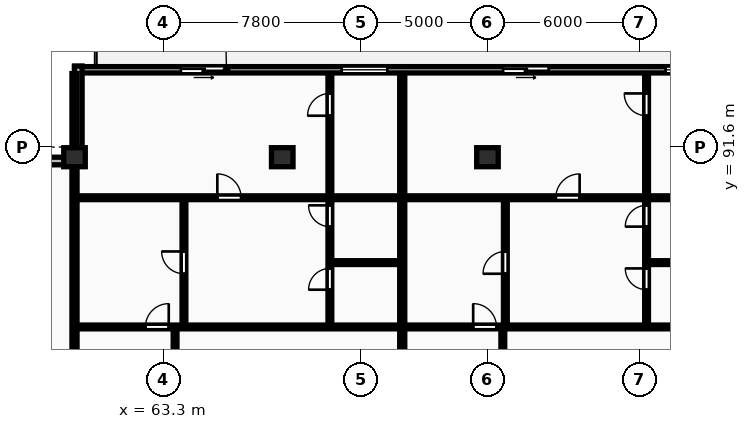
"""IFC4 building model, lengths in metres.
Left out: names, types, materials, properties, quantities, classifications, styles, units other than length and angle.
Written with IfcOpenShell. Run it as: python <this file> out.ifc"""

import sys

from ifc_helpers import new_model, si_unit, direction, frame, frame_2d, origin, origin_2d, place, context, subcontext, project, spatial, rectangle, extrude, element, fill, save


model = new_model("IFC4")
c1 = context("Model", 3, precision=1e-05, world=origin(), true_north=direction((0.0, 1.0)))
c2 = subcontext(c1, "Body", "Model", "MODEL_VIEW")
j1 = project(units=[si_unit("LENGTHUNIT", "METRE"), si_unit("PLANEANGLEUNIT", "RADIAN")], contexts=[c1])
p1 = place(None, origin())
s1 = spatial("IfcSite", under=j1, at=p1, CompositionType="ELEMENT")
p2 = place(p1, origin())
s2 = spatial("IfcBuilding", under=s1, at=p2, CompositionType="ELEMENT")
p3 = place(p2, frame((0.0, 0.0, 210.85)))
s3 = spatial("IfcBuildingStorey", under=s2, at=p3, CompositionType="ELEMENT", Elevation=210.85)
for number, where, z_axis, x_axis in (
    (1, (59.8, 91.2, 0.0), (0.0, 0.0, 1.0), (1.0, 0.0, 0.0)),
    (2, (68.0, 91.2, 0.0), (0.0, 0.0, 1.0), (1.0, 0.0, 0.0)),
    (3, (76.1, 91.2, 0.0), (0.0, 0.0, 1.0), (1.0, 0.0, 0.0)),
):
    element("IfcColumn", number, at=place(p3, frame(where, z_axis=z_axis, x_axis=x_axis)), inside=s3, PredefinedType="COLUMN", context=c2, shape_type="SweptSolid", body=[
        extrude(rectangle(XDim=0.85, YDim=0.75, at=origin_2d()), origin(), (0.0, 0.0, 1.0), 3.25),
    ])
p4 = place(p3, frame((128.4, 94.65, 0.0), z_axis=(0.0, 0.0, 1.0), x_axis=(-1.0, 0.0, 0.0)))
e4 = element("IfcWall", 4, at=p4, inside=s3, PredefinedType="STANDARD", context=c2, shape_type="SweptSolid", body=[
    extrude(rectangle(XDim=68.6, YDim=0.25, at=frame_2d((34.3, 0.0))), origin(), (0.0, 0.0, 1.0), 2.97),
])
p5 = place(p4, frame((62.6, 0.0, 0.0)))
e5 = element("IfcOpeningElement", 5, at=p5, cuts=e4, PredefinedType="OPENING", context=c2, shape_type="SweptSolid", body=[
    extrude(rectangle(XDim=1.8, YDim=2.2, at=frame_2d((0.9, 1.1))), frame((0.0, 0.135, 0.0), z_axis=(0.0, -1.0, 0.0), x_axis=(1.0, 0.0, 0.0)), (0.0, 0.0, 1.0), 0.27),
])
p6 = place(p4, frame((56.252, 0.0, 0.85)))
e6 = element("IfcOpeningElement", 6, at=p6, cuts=e4, PredefinedType="OPENING", context=c2, shape_type="SweptSolid", body=[
    extrude(rectangle(XDim=1.8, YDim=1.8, at=frame_2d((0.9, 0.9))), frame((0.0, 0.135, 0.0), z_axis=(0.0, -1.0, 0.0), x_axis=(1.0, 0.0, 0.0)), (0.0, 0.0, 1.0), 0.27),
])
p7 = place(p4, frame((49.882, 0.0, 0.0)))
e7 = element("IfcOpeningElement", 7, at=p7, cuts=e4, PredefinedType="OPENING", context=c2, shape_type="SweptSolid", body=[
    extrude(rectangle(XDim=1.8, YDim=2.2, at=frame_2d((0.9, 1.1))), frame((0.0, 0.135, 0.0), z_axis=(0.0, -1.0, 0.0), x_axis=(1.0, 0.0, 0.0)), (0.0, 0.0, 1.0), 0.27),
])
p8 = place(p4, frame((43.47, 0.0, 0.85)))
e8 = element("IfcOpeningElement", 8, at=p8, cuts=e4, PredefinedType="OPENING", context=c2, shape_type="SweptSolid", body=[
    extrude(rectangle(XDim=1.8, YDim=1.8, at=frame_2d((0.9, 0.9))), frame((0.0, 0.135, 0.0), z_axis=(0.0, -1.0, 0.0), x_axis=(1.0, 0.0, 0.0)), (0.0, 0.0, 1.0), 0.27),
])
p9 = place(p4, frame((36.75, 0.0, 0.0)))
e9 = element("IfcOpeningElement", 9, at=p9, cuts=e4, PredefinedType="OPENING", context=c2, shape_type="SweptSolid", body=[
    extrude(rectangle(XDim=1.8, YDim=2.2, at=frame_2d((0.9, 1.1))), frame((0.0, 0.135, 0.0), z_axis=(0.0, -1.0, 0.0), x_axis=(1.0, 0.0, 0.0)), (0.0, 0.0, 1.0), 0.27),
])
p10 = place(p4, frame((30.402, 0.0, 0.85)))
e10 = element("IfcOpeningElement", 10, at=p10, cuts=e4, PredefinedType="OPENING", context=c2, shape_type="SweptSolid", body=[
    extrude(rectangle(XDim=1.8, YDim=1.8, at=frame_2d((0.9, 0.9))), frame((0.0, 0.135, 0.0), z_axis=(0.0, -1.0, 0.0), x_axis=(1.0, 0.0, 0.0)), (0.0, 0.0, 1.0), 0.27),
])
p11 = place(p4, frame((23.882, 0.0, 0.0)))
e11 = element("IfcOpeningElement", 11, at=p11, cuts=e4, PredefinedType="OPENING", context=c2, shape_type="SweptSolid", body=[
    extrude(rectangle(XDim=1.8, YDim=2.2, at=frame_2d((0.9, 1.1))), frame((0.0, 0.135, 0.0), z_axis=(0.0, -1.0, 0.0), x_axis=(1.0, 0.0, 0.0)), (0.0, 0.0, 1.0), 0.27),
])
p12 = place(p4, frame((17.47, 0.0, 0.85)))
e12 = element("IfcOpeningElement", 12, at=p12, cuts=e4, PredefinedType="OPENING", context=c2, shape_type="SweptSolid", body=[
    extrude(rectangle(XDim=1.8, YDim=1.8, at=frame_2d((0.9, 0.9))), frame((0.0, 0.135, 0.0), z_axis=(0.0, -1.0, 0.0), x_axis=(1.0, 0.0, 0.0)), (0.0, 0.0, 1.0), 0.27),
])
p13 = place(p4, frame((9.415, 0.0, 0.85)))
e13 = element("IfcOpeningElement", 13, at=p13, cuts=e4, PredefinedType="OPENING", context=c2, shape_type="SweptSolid", body=[
    extrude(rectangle(XDim=1.8, YDim=1.8, at=frame_2d((0.9, 0.9))), frame((0.0, 0.135, 0.0), z_axis=(0.0, -1.0, 0.0), x_axis=(1.0, 0.0, 0.0)), (0.0, 0.0, 1.0), 0.27),
])
p14 = place(p4, frame((5.756, 0.0, 0.85)))
e14 = element("IfcOpeningElement", 14, at=p14, cuts=e4, PredefinedType="OPENING", context=c2, shape_type="SweptSolid", body=[
    extrude(rectangle(XDim=1.8, YDim=1.8, at=frame_2d((0.9, 0.9))), frame((0.0, 0.135, 0.0), z_axis=(0.0, -1.0, 0.0), x_axis=(1.0, 0.0, 0.0)), (0.0, 0.0, 1.0), 0.27),
])
p15 = place(p4, frame((13.35, 0.0, 0.0)))
e15 = element("IfcOpeningElement", 15, at=p15, cuts=e4, PredefinedType="OPENING", context=c2, shape_type="SweptSolid", body=[
    extrude(rectangle(XDim=1.8, YDim=2.2, at=frame_2d((0.9, 1.1))), frame((0.0, 0.135, 0.0), z_axis=(0.0, -1.0, 0.0), x_axis=(1.0, 0.0, 0.0)), (0.0, 0.0, 1.0), 0.27),
])
p16 = place(p4, frame((1.21, 0.0, 0.85)))
e16 = element("IfcOpeningElement", 16, at=p16, cuts=e4, PredefinedType="OPENING", context=c2, shape_type="SweptSolid", body=[
    extrude(rectangle(XDim=2.4, YDim=1.9, at=frame_2d((1.2, 0.95))), frame((0.0, 0.135, 0.0), z_axis=(0.0, -1.0, 0.0), x_axis=(1.0, 0.0, 0.0)), (0.0, 0.0, 1.0), 0.27),
])
for number, where, z_axis, x_axis in (
    (17, (59.95, 94.8, 0.0), (0.0, 0.0, 1.0), (0.0, -1.0, 0.0)),
    (18, (59.8, 91.05, 0.0), (0.0, 0.0, 1.0), (-1.0, 0.0, 0.0)),
):
    element("IfcWall", number, at=place(p3, frame(where, z_axis=z_axis, x_axis=x_axis)), inside=s3, PredefinedType="STANDARD", context=c2, shape_type="SweptSolid", body=[
        extrude(rectangle(XDim=3.6, YDim=0.3, at=frame_2d((1.8, 0.0))), origin(), (0.0, 0.0, 1.0), 2.97),
    ])
p17 = place(p3, frame((59.8, 70.18, 0.0), z_axis=(0.0, 0.0, 1.0), x_axis=(0.0, 1.0, 0.0)))
e19 = element("IfcWall", 19, at=p17, inside=s3, PredefinedType="PARTITIONING", context=c2, shape_type="SweptSolid", body=[
    extrude(rectangle(XDim=24.32, YDim=0.2, at=frame_2d((12.16, 0.0))), origin(), (0.0, 0.0, 1.0), 2.277),
])
p18 = place(p3, frame((72.736, 70.18, 0.0), z_axis=(0.0, 0.0, 1.0), x_axis=(0.0, 1.0, 0.0)))
e20 = element("IfcWall", 20, at=p18, inside=s3, PredefinedType="PARTITIONING", context=c2, shape_type="SweptSolid", body=[
    extrude(rectangle(XDim=24.32, YDim=0.2, at=frame_2d((12.16, 0.0))), origin(), (0.0, 0.0, 1.0), 2.97),
])
p19 = place(p3, frame((63.77, 70.16, 0.0), z_axis=(0.0, 0.0, 1.0), x_axis=(0.0, 1.0, 0.0)))
e21 = element("IfcWall", 21, at=p19, inside=s3, PredefinedType="PARTITIONING", context=c2, shape_type="SweptSolid", body=[
    extrude(rectangle(XDim=14.3, YDim=0.15, at=frame_2d((7.15, 0.0))), origin(), (0.0, 0.0, 1.0), 2.97),
])
p20 = place(p19, frame((6.02, 0.0, 0.0)))
e22 = element("IfcOpeningElement", 22, at=p20, cuts=e21, PredefinedType="OPENING", context=c2, shape_type="SweptSolid", body=[
    extrude(rectangle(XDim=0.88, YDim=2.06, at=frame_2d((0.44, 1.03))), frame((0.0, 0.085, 0.0), z_axis=(0.0, -1.0, 0.0), x_axis=(1.0, 0.0, 0.0)), (0.0, 0.0, 1.0), 0.17),
])
p21 = place(p3, frame((64.12, 84.54, 0.0), z_axis=(0.0, 0.0, 1.0), x_axis=(0.0, 1.0, 0.0)))
e23 = element("IfcWall", 23, at=p21, inside=s3, PredefinedType="PARTITIONING", context=c2, shape_type="SweptSolid", body=[
    extrude(rectangle(XDim=5.0, YDim=0.15, at=frame_2d((2.5, 0.0))), origin(), (0.0, 0.0, 1.0), 2.97),
])
p22 = place(p21, frame((2.06, 0.0, 0.0)))
e24 = element("IfcOpeningElement", 24, at=p22, cuts=e23, PredefinedType="OPENING", context=c2, shape_type="SweptSolid", body=[
    extrude(rectangle(XDim=0.88, YDim=2.06, at=frame_2d((0.44, 1.03))), frame((0.0, 0.085, 0.0), z_axis=(0.0, -1.0, 0.0), x_axis=(1.0, 0.0, 0.0)), (0.0, 0.0, 1.0), 0.17),
])
p23 = place(p3, frame((69.94, 87.04, 0.0), z_axis=(0.0, 0.0, 1.0), x_axis=(1.0, 0.0, 0.0)))
e25 = element("IfcWall", 25, at=p23, inside=s3, PredefinedType="PARTITIONING", context=c2, shape_type="SweptSolid", body=[
    extrude(rectangle(XDim=2.716, YDim=0.15, at=frame_2d((1.358, 0.0))), origin(), (0.0, 0.0, 1.0), 2.97),
])
p24 = place(p3, frame((69.88, 84.54, 0.0), z_axis=(0.0, 0.0, 1.0), x_axis=(0.0, 1.0, 0.0)))
e26 = element("IfcWall", 26, at=p24, inside=s3, PredefinedType="PARTITIONING", context=c2, shape_type="SweptSolid", body=[
    extrude(rectangle(XDim=9.96, YDim=0.15, at=frame_2d((4.98, 0.0))), origin(), (0.0, 0.0, 1.0), 2.97),
])
p25 = place(p24, frame((1.43, 0.0, 0.0)))
e27 = element("IfcOpeningElement", 27, at=p25, cuts=e26, PredefinedType="OPENING", context=c2, shape_type="SweptSolid", body=[
    extrude(rectangle(XDim=0.84, YDim=2.04, at=frame_2d((0.42, 1.02))), frame((0.0, 0.085, 0.0), z_axis=(0.0, -1.0, 0.0), x_axis=(1.0, 0.0, 0.0)), (0.0, 0.0, 1.0), 0.17),
])
p26 = place(p24, frame((3.92, 0.0, 0.0)))
e28 = element("IfcOpeningElement", 28, at=p26, cuts=e26, PredefinedType="OPENING", context=c2, shape_type="SweptSolid", body=[
    extrude(rectangle(XDim=0.84, YDim=2.04, at=frame_2d((0.42, 1.02))), frame((0.0, 0.085, 0.0), z_axis=(0.0, -1.0, 0.0), x_axis=(1.0, 0.0, 0.0)), (0.0, 0.0, 1.0), 0.17),
])
p27 = place(p24, frame((8.297, 0.0, 0.0)))
e29 = element("IfcOpeningElement", 29, at=p27, cuts=e26, PredefinedType="OPENING", context=c2, shape_type="SweptSolid", body=[
    extrude(rectangle(XDim=0.88, YDim=2.06, at=frame_2d((0.44, 1.03))), frame((0.0, 0.085, 0.0), z_axis=(0.0, -1.0, 0.0), x_axis=(1.0, 0.0, 0.0)), (0.0, 0.0, 1.0), 0.17),
])
p28 = place(p3, frame((59.88, 84.5, 0.0), z_axis=(0.0, 0.0, 1.0), x_axis=(1.0, 0.0, 0.0)))
e30 = element("IfcWall", 30, at=p28, inside=s3, PredefinedType="PARTITIONING", context=c2, shape_type="SweptSolid", body=[
    extrude(rectangle(XDim=12.776, YDim=0.15, at=frame_2d((6.388, 0.0))), origin(), (0.0, 0.0, 1.0), 2.97),
])
p29 = place(p28, frame((2.72, 0.0, 0.0)))
e31 = element("IfcOpeningElement", 31, at=p29, cuts=e30, PredefinedType="OPENING", context=c2, shape_type="SweptSolid", body=[
    extrude(rectangle(XDim=0.92, YDim=2.08, at=frame_2d((0.46, 1.04))), frame((0.0, 0.085, 0.0), z_axis=(0.0, -1.0, 0.0), x_axis=(1.0, 0.0, 0.0)), (0.0, 0.0, 1.0), 0.17),
])
p30 = place(p3, frame((59.88, 89.6, 0.0), z_axis=(0.0, 0.0, 1.0), x_axis=(1.0, 0.0, 0.0)))
e32 = element("IfcWall", 32, at=p30, inside=s3, PredefinedType="PARTITIONING", context=c2, shape_type="SweptSolid", body=[
    extrude(rectangle(XDim=12.776, YDim=0.15, at=frame_2d((6.388, 0.0))), origin(), (0.0, 0.0, 1.0), 2.97),
])
p31 = place(p30, frame((5.557, 0.0, 0.0)))
e33 = element("IfcOpeningElement", 33, at=p31, cuts=e32, PredefinedType="OPENING", context=c2, shape_type="SweptSolid", body=[
    extrude(rectangle(XDim=0.94, YDim=2.1, at=frame_2d((0.47, 1.05))), frame((0.0, 0.085, 0.0), z_axis=(0.0, -1.0, 0.0), x_axis=(1.0, 0.0, 0.0)), (0.0, 0.0, 1.0), 0.17),
])
p32 = place(p3, frame((76.706, 70.16, 0.0), z_axis=(0.0, 0.0, 1.0), x_axis=(0.0, 1.0, 0.0)))
e34 = element("IfcWall", 34, at=p32, inside=s3, PredefinedType="PARTITIONING", context=c2, shape_type="SweptSolid", body=[
    extrude(rectangle(XDim=14.3, YDim=0.15, at=frame_2d((7.15, 0.0))), origin(), (0.0, 0.0, 1.0), 2.97),
])
p33 = place(p32, frame((6.2, 0.0, 0.0)))
e35 = element("IfcOpeningElement", 35, at=p33, cuts=e34, PredefinedType="OPENING", context=c2, shape_type="SweptSolid", body=[
    extrude(rectangle(XDim=0.88, YDim=2.06, at=frame_2d((0.44, 1.03))), frame((0.0, 0.085, 0.0), z_axis=(0.0, -1.0, 0.0), x_axis=(1.0, 0.0, 0.0)), (0.0, 0.0, 1.0), 0.17),
])
p34 = place(p3, frame((76.806, 84.54, 0.0), z_axis=(0.0, 0.0, 1.0), x_axis=(0.0, 1.0, 0.0)))
e36 = element("IfcWall", 36, at=p34, inside=s3, PredefinedType="PARTITIONING", context=c2, shape_type="SweptSolid", body=[
    extrude(rectangle(XDim=5.0, YDim=0.15, at=frame_2d((2.5, 0.0))), origin(), (0.0, 0.0, 1.0), 2.97),
])
p35 = place(p34, frame((2.06, 0.0, 0.0)))
e37 = element("IfcOpeningElement", 37, at=p35, cuts=e36, PredefinedType="OPENING", context=c2, shape_type="SweptSolid", body=[
    extrude(rectangle(XDim=0.88, YDim=2.06, at=frame_2d((0.44, 1.03))), frame((0.0, 0.085, 0.0), z_axis=(0.0, -1.0, 0.0), x_axis=(1.0, 0.0, 0.0)), (0.0, 0.0, 1.0), 0.17),
])
p36 = place(p3, frame((82.44, 87.04, 0.0), z_axis=(0.0, 0.0, 1.0), x_axis=(1.0, 0.0, 0.0)))
e38 = element("IfcWall", 38, at=p36, inside=s3, PredefinedType="PARTITIONING", context=c2, shape_type="SweptSolid", body=[
    extrude(rectangle(XDim=3.28, YDim=0.15, at=frame_2d((1.64, 0.0))), origin(), (0.0, 0.0, 1.0), 2.97),
])
p37 = place(p3, frame((82.38, 84.54, 0.0), z_axis=(0.0, 0.0, 1.0), x_axis=(0.0, 1.0, 0.0)))
e39 = element("IfcWall", 39, at=p37, inside=s3, PredefinedType="PARTITIONING", context=c2, shape_type="SweptSolid", body=[
    extrude(rectangle(XDim=9.96, YDim=0.15, at=frame_2d((4.98, 0.0))), origin(), (0.0, 0.0, 1.0), 2.97),
])
p38 = place(p37, frame((1.43, 0.0, 0.0)))
e40 = element("IfcOpeningElement", 40, at=p38, cuts=e39, PredefinedType="OPENING", context=c2, shape_type="SweptSolid", body=[
    extrude(rectangle(XDim=0.84, YDim=2.04, at=frame_2d((0.42, 1.02))), frame((0.0, 0.085, 0.0), z_axis=(0.0, -1.0, 0.0), x_axis=(1.0, 0.0, 0.0)), (0.0, 0.0, 1.0), 0.17),
])
p39 = place(p37, frame((3.92, 0.0, 0.0)))
e41 = element("IfcOpeningElement", 41, at=p39, cuts=e39, PredefinedType="OPENING", context=c2, shape_type="SweptSolid", body=[
    extrude(rectangle(XDim=0.84, YDim=2.04, at=frame_2d((0.42, 1.02))), frame((0.0, 0.085, 0.0), z_axis=(0.0, -1.0, 0.0), x_axis=(1.0, 0.0, 0.0)), (0.0, 0.0, 1.0), 0.17),
])
p40 = place(p37, frame((8.297, 0.0, 0.0)))
e42 = element("IfcOpeningElement", 42, at=p40, cuts=e39, PredefinedType="OPENING", context=c2, shape_type="SweptSolid", body=[
    extrude(rectangle(XDim=0.88, YDim=2.06, at=frame_2d((0.44, 1.03))), frame((0.0, 0.085, 0.0), z_axis=(0.0, -1.0, 0.0), x_axis=(1.0, 0.0, 0.0)), (0.0, 0.0, 1.0), 0.17),
])
p41 = place(p3, frame((72.816, 84.5, 0.0), z_axis=(0.0, 0.0, 1.0), x_axis=(1.0, 0.0, 0.0)))
e43 = element("IfcWall", 43, at=p41, inside=s3, PredefinedType="PARTITIONING", context=c2, shape_type="SweptSolid", body=[
    extrude(rectangle(XDim=12.904, YDim=0.15, at=frame_2d((6.452, 0.0))), origin(), (0.0, 0.0, 1.0), 2.97),
])
p42 = place(p41, frame((2.72, 0.0, 0.0)))
e44 = element("IfcOpeningElement", 44, at=p42, cuts=e43, PredefinedType="OPENING", context=c2, shape_type="SweptSolid", body=[
    extrude(rectangle(XDim=0.92, YDim=2.08, at=frame_2d((0.46, 1.04))), frame((0.0, 0.085, 0.0), z_axis=(0.0, -1.0, 0.0), x_axis=(1.0, 0.0, 0.0)), (0.0, 0.0, 1.0), 0.17),
])
p43 = place(p3, frame((72.816, 89.6, 0.0), z_axis=(0.0, 0.0, 1.0), x_axis=(1.0, 0.0, 0.0)))
e45 = element("IfcWall", 45, at=p43, inside=s3, PredefinedType="PARTITIONING", context=c2, shape_type="SweptSolid", body=[
    extrude(rectangle(XDim=12.904, YDim=0.15, at=frame_2d((6.452, 0.0))), origin(), (0.0, 0.0, 1.0), 2.97),
])
p44 = place(p43, frame((5.982, 0.0, 0.0)))
e46 = element("IfcOpeningElement", 46, at=p44, cuts=e45, PredefinedType="OPENING", context=c2, shape_type="SweptSolid", body=[
    extrude(rectangle(XDim=0.94, YDim=2.1, at=frame_2d((0.47, 1.05))), frame((0.0, 0.085, 0.0), z_axis=(0.0, -1.0, 0.0), x_axis=(1.0, 0.0, 0.0)), (0.0, 0.0, 1.0), 0.17),
])
p45 = place(p5, origin())
e47 = element("IfcDoor", 47, at=p45, inside=s3, OperationType="SLIDING_TO_LEFT", PredefinedType="DOOR", context=c2, shape_type="SweptSolid", body=[
    extrude(rectangle(XDim=1.8, YDim=2.2, at=frame_2d((0.9, 1.1))), frame((0.0, 0.025, 0.0), z_axis=(0.0, -1.0, 0.0), x_axis=(1.0, 0.0, 0.0)), (0.0, 0.0, 1.0), 0.05),
])
fill(e5, e47)
p46 = place(p6, origin())
e48 = element("IfcWindow", 48, at=p46, inside=s3, PartitioningType="SINGLE_PANEL", PredefinedType="WINDOW", context=c2, shape_type="SweptSolid", body=[
    extrude(rectangle(XDim=1.8, YDim=1.8, at=frame_2d((0.9, 0.9))), frame((0.0, 0.03, 0.0), z_axis=(0.0, -1.0, 0.0), x_axis=(1.0, 0.0, 0.0)), (0.0, 0.0, 1.0), 0.06),
])
fill(e6, e48)
p47 = place(p7, origin())
e49 = element("IfcDoor", 49, at=p47, inside=s3, OperationType="SLIDING_TO_LEFT", PredefinedType="DOOR", context=c2, shape_type="SweptSolid", body=[
    extrude(rectangle(XDim=1.8, YDim=2.2, at=frame_2d((0.9, 1.1))), frame((0.0, 0.025, 0.0), z_axis=(0.0, -1.0, 0.0), x_axis=(1.0, 0.0, 0.0)), (0.0, 0.0, 1.0), 0.05),
])
fill(e7, e49)
p48 = place(p8, origin())
e50 = element("IfcWindow", 50, at=p48, inside=s3, PartitioningType="SINGLE_PANEL", PredefinedType="WINDOW", context=c2, shape_type="SweptSolid", body=[
    extrude(rectangle(XDim=1.8, YDim=1.8, at=frame_2d((0.9, 0.9))), frame((0.0, 0.03, 0.0), z_axis=(0.0, -1.0, 0.0), x_axis=(1.0, 0.0, 0.0)), (0.0, 0.0, 1.0), 0.06),
])
fill(e8, e50)
p49 = place(p22, origin())
e51 = element("IfcDoor", 51, at=p49, inside=s3, OperationType="SINGLE_SWING_RIGHT", PredefinedType="DOOR", context=c2, shape_type="SweptSolid", body=[
    extrude(rectangle(XDim=0.88, YDim=2.06, at=frame_2d((0.44, 1.03))), frame((0.0, 0.025, 0.0), z_axis=(0.0, -1.0, 0.0), x_axis=(1.0, 0.0, 0.0)), (0.0, 0.0, 1.0), 0.05),
])
fill(e24, e51)
p50 = place(p25, origin())
e52 = element("IfcDoor", 52, at=p50, inside=s3, OperationType="SINGLE_SWING_LEFT", PredefinedType="DOOR", context=c2, shape_type="SweptSolid", body=[
    extrude(rectangle(XDim=0.84, YDim=2.04, at=frame_2d((0.42, 1.02))), frame((0.0, 0.025, 0.0), z_axis=(0.0, -1.0, 0.0), x_axis=(1.0, 0.0, 0.0)), (0.0, 0.0, 1.0), 0.05),
])
fill(e27, e52)
p51 = place(p26, origin())
e53 = element("IfcDoor", 53, at=p51, inside=s3, OperationType="SINGLE_SWING_RIGHT", PredefinedType="DOOR", context=c2, shape_type="SweptSolid", body=[
    extrude(rectangle(XDim=0.84, YDim=2.04, at=frame_2d((0.42, 1.02))), frame((0.0, 0.025, 0.0), z_axis=(0.0, -1.0, 0.0), x_axis=(1.0, 0.0, 0.0)), (0.0, 0.0, 1.0), 0.05),
])
fill(e28, e53)
p52 = place(p27, origin())
e54 = element("IfcDoor", 54, at=p52, inside=s3, OperationType="SINGLE_SWING_LEFT", PredefinedType="DOOR", context=c2, shape_type="SweptSolid", body=[
    extrude(rectangle(XDim=0.88, YDim=2.06, at=frame_2d((0.44, 1.03))), frame((0.0, 0.025, 0.0), z_axis=(0.0, -1.0, 0.0), x_axis=(1.0, 0.0, 0.0)), (0.0, 0.0, 1.0), 0.05),
])
fill(e29, e54)
p53 = place(p29, origin())
e55 = element("IfcDoor", 55, at=p53, inside=s3, OperationType="SINGLE_SWING_RIGHT", PredefinedType="DOOR", context=c2, shape_type="SweptSolid", body=[
    extrude(rectangle(XDim=0.92, YDim=2.08, at=frame_2d((0.46, 1.04))), frame((0.0, 0.025, 0.0), z_axis=(0.0, -1.0, 0.0), x_axis=(1.0, 0.0, 0.0)), (0.0, 0.0, 1.0), 0.05),
])
fill(e31, e55)
p54 = place(p31, origin())
e56 = element("IfcDoor", 56, at=p54, inside=s3, OperationType="SINGLE_SWING_LEFT", PredefinedType="DOOR", context=c2, shape_type="SweptSolid", body=[
    extrude(rectangle(XDim=0.94, YDim=2.1, at=frame_2d((0.47, 1.05))), frame((0.0, 0.025, 0.0), z_axis=(0.0, -1.0, 0.0), x_axis=(1.0, 0.0, 0.0)), (0.0, 0.0, 1.0), 0.05),
])
fill(e33, e56)
p55 = place(p35, origin())
e57 = element("IfcDoor", 57, at=p55, inside=s3, OperationType="SINGLE_SWING_LEFT", PredefinedType="DOOR", context=c2, shape_type="SweptSolid", body=[
    extrude(rectangle(XDim=0.88, YDim=2.06, at=frame_2d((0.44, 1.03))), frame((0.0, 0.025, 0.0), z_axis=(0.0, -1.0, 0.0), x_axis=(1.0, 0.0, 0.0)), (0.0, 0.0, 1.0), 0.05),
])
fill(e37, e57)
p56 = place(p38, origin())
e58 = element("IfcDoor", 58, at=p56, inside=s3, OperationType="SINGLE_SWING_RIGHT", PredefinedType="DOOR", context=c2, shape_type="SweptSolid", body=[
    extrude(rectangle(XDim=0.84, YDim=2.04, at=frame_2d((0.42, 1.02))), frame((0.0, 0.025, 0.0), z_axis=(0.0, -1.0, 0.0), x_axis=(1.0, 0.0, 0.0)), (0.0, 0.0, 1.0), 0.05),
])
fill(e40, e58)
p57 = place(p39, origin())
e59 = element("IfcDoor", 59, at=p57, inside=s3, OperationType="SINGLE_SWING_LEFT", PredefinedType="DOOR", context=c2, shape_type="SweptSolid", body=[
    extrude(rectangle(XDim=0.84, YDim=2.04, at=frame_2d((0.42, 1.02))), frame((0.0, 0.025, 0.0), z_axis=(0.0, -1.0, 0.0), x_axis=(1.0, 0.0, 0.0)), (0.0, 0.0, 1.0), 0.05),
])
fill(e41, e59)
p58 = place(p40, origin())
e60 = element("IfcDoor", 60, at=p58, inside=s3, OperationType="SINGLE_SWING_RIGHT", PredefinedType="DOOR", context=c2, shape_type="SweptSolid", body=[
    extrude(rectangle(XDim=0.88, YDim=2.06, at=frame_2d((0.44, 1.03))), frame((0.0, 0.025, 0.0), z_axis=(0.0, -1.0, 0.0), x_axis=(1.0, 0.0, 0.0)), (0.0, 0.0, 1.0), 0.05),
])
fill(e42, e60)
p59 = place(p42, origin())
e61 = element("IfcDoor", 61, at=p59, inside=s3, OperationType="SINGLE_SWING_LEFT", PredefinedType="DOOR", context=c2, shape_type="SweptSolid", body=[
    extrude(rectangle(XDim=0.92, YDim=2.08, at=frame_2d((0.46, 1.04))), frame((0.0, 0.025, 0.0), z_axis=(0.0, -1.0, 0.0), x_axis=(1.0, 0.0, 0.0)), (0.0, 0.0, 1.0), 0.05),
])
fill(e44, e61)
p60 = place(p44, origin())
e62 = element("IfcDoor", 62, at=p60, inside=s3, OperationType="SINGLE_SWING_RIGHT", PredefinedType="DOOR", context=c2, shape_type="SweptSolid", body=[
    extrude(rectangle(XDim=0.94, YDim=2.1, at=frame_2d((0.47, 1.05))), frame((0.0, 0.025, 0.0), z_axis=(0.0, -1.0, 0.0), x_axis=(1.0, 0.0, 0.0)), (0.0, 0.0, 1.0), 0.05),
])
fill(e46, e62)
save(model, sys.argv[1])
